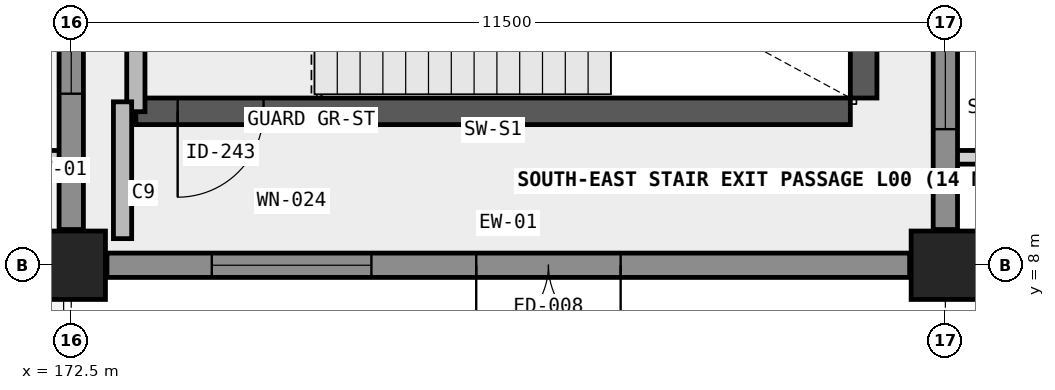
"""IFC4 building model, lengths in metres.
Left out: names, types, materials, properties, quantities, classifications, styles, units other than length and angle.
Written with IfcOpenShell. Run it as: python <this file> out.ifc"""

import sys

from ifc_helpers import new_model, si_unit, direction, frame, frame_2d, origin, origin_2d, place, context, subcontext, project, spatial, rectangle, circle, extrude, element, fill, save


model = new_model("IFC4")
c1 = context("Model", 3, precision=1e-05, world=origin(), true_north=direction((0.0, 1.0)))
c2 = subcontext(c1, "Body", "Model", "MODEL_VIEW")
j1 = project(units=[si_unit("LENGTHUNIT", "METRE"), si_unit("PLANEANGLEUNIT", "RADIAN")], contexts=[c1])
p1 = place(None, origin())
s1 = spatial("IfcSite", under=j1, at=p1, CompositionType="ELEMENT")
p2 = place(p1, origin())
s2 = spatial("IfcBuilding", under=s1, at=p2, CompositionType="ELEMENT")
p3 = place(p2, origin())
s3 = spatial("IfcBuildingStorey", under=s2, at=p3, CompositionType="ELEMENT", Elevation=0.0)
for number, where, z_axis, x_axis in (
    (1, (172.5, 8.0, 0.0), (0.0, 0.0, 1.0), (1.0, 0.0, 0.0)),
    (2, (184.0, 8.0, 0.0), (0.0, 0.0, 1.0), (1.0, 0.0, 0.0)),
):
    element("IfcColumn", number, at=place(p3, frame(where, z_axis=z_axis, x_axis=x_axis)), inside=s3, PredefinedType="COLUMN", context=c2, shape_type="SweptSolid", body=[
        extrude(circle(Radius=0.45, at=origin_2d()), origin(), (0.0, 0.0, 1.0), 4.2),
    ])
p4 = place(p3, frame((173.35, 10.025, 0.0), z_axis=(0.0, 0.0, 1.0), x_axis=(1.0, 0.0, 0.0)))
e3 = element("IfcWall", 3, at=p4, inside=s3, PredefinedType="SHEAR", context=c2, shape_type="SweptSolid", body=[
    extrude(rectangle(XDim=9.4, YDim=0.35, at=frame_2d((4.7, 0.0))), origin(), (0.0, 0.0, 1.0), 4.2),
])
p5 = place(p4, frame((0.55, 0.0, 0.0)))
e4 = element("IfcOpeningElement", 4, at=p5, cuts=e3, PredefinedType="OPENING", context=c2, shape_type="SweptSolid", body=[
    extrude(rectangle(XDim=1.13, YDim=2.15, at=frame_2d((0.565, 1.075))), frame((0.0, 0.185, 0.0), z_axis=(0.0, -1.0, 0.0), x_axis=(1.0, 0.0, 0.0)), (0.0, 0.0, 1.0), 0.37),
])
p6 = place(p3, frame((182.925, 10.2, 0.0), z_axis=(0.0, 0.0, 1.0), x_axis=(0.0, 1.0, 0.0)))
e5 = element("IfcWall", 5, at=p6, inside=s3, PredefinedType="SHEAR", context=c2, shape_type="SweptSolid", body=[
    extrude(rectangle(XDim=3.8, YDim=0.35, at=frame_2d((1.9, 0.0))), origin(), (0.0, 0.0, 1.0), 4.2),
])
p7 = place(p3, frame((172.5, 8.47, 0.0), z_axis=(0.0, 0.0, 1.0), x_axis=(0.0, 1.0, 0.0)))
e6 = element("IfcWall", 6, at=p7, inside=s3, PredefinedType="SOLIDWALL", context=c2, shape_type="SweptSolid", body=[
    extrude(rectangle(XDim=8.76, YDim=0.32, at=frame_2d((4.38, 0.0))), origin(), (0.0, 0.0, 1.0), 3.0),
])
p8 = place(p7, frame((1.787, 0.0, 0.85)))
e7 = element("IfcOpeningElement", 7, at=p8, cuts=e6, PredefinedType="OPENING", context=c2, shape_type="SweptSolid", body=[
    extrude(rectangle(XDim=1.7, YDim=1.5, at=frame_2d((0.85, 0.75))), frame((0.0, 0.17, 0.0), z_axis=(0.0, -1.0, 0.0), x_axis=(1.0, 0.0, 0.0)), (0.0, 0.0, 1.0), 0.34),
])
p9 = place(p7, frame((5.273, 0.0, 0.85)))
e8 = element("IfcOpeningElement", 8, at=p9, cuts=e6, PredefinedType="OPENING", context=c2, shape_type="SweptSolid", body=[
    extrude(rectangle(XDim=1.7, YDim=1.5, at=frame_2d((0.85, 0.75))), frame((0.0, 0.17, 0.0), z_axis=(0.0, -1.0, 0.0), x_axis=(1.0, 0.0, 0.0)), (0.0, 0.0, 1.0), 0.34),
])
p10 = place(p3, frame((172.97, 8.0, 0.0), z_axis=(0.0, 0.0, 1.0), x_axis=(1.0, 0.0, 0.0)))
e9 = element("IfcWall", 9, at=p10, inside=s3, PredefinedType="SOLIDWALL", context=c2, shape_type="SweptSolid", body=[
    extrude(rectangle(XDim=10.56, YDim=0.32, at=frame_2d((5.28, 0.0))), origin(), (0.0, 0.0, 1.0), 3.0),
])
p11 = place(p10, frame((4.858, 0.0, 0.0)))
e10 = element("IfcOpeningElement", 10, at=p11, cuts=e9, PredefinedType="OPENING", context=c2, shape_type="SweptSolid", body=[
    extrude(rectangle(XDim=1.9, YDim=2.2, at=frame_2d((0.95, 1.1))), frame((0.0, 0.17, 0.0), z_axis=(0.0, -1.0, 0.0), x_axis=(1.0, 0.0, 0.0)), (0.0, 0.0, 1.0), 0.34),
])
p12 = place(p10, frame((1.379, 0.0, 0.78)))
e11 = element("IfcOpeningElement", 11, at=p12, cuts=e9, PredefinedType="OPENING", context=c2, shape_type="SweptSolid", body=[
    extrude(rectangle(XDim=2.1, YDim=2.1, at=frame_2d((1.05, 1.05))), frame((0.0, 0.17, 0.0), z_axis=(0.0, -1.0, 0.0), x_axis=(1.0, 0.0, 0.0)), (0.0, 0.0, 1.0), 0.34),
])
p13 = place(p3, frame((184.0, 8.47, 0.0), z_axis=(0.0, 0.0, 1.0), x_axis=(0.0, 1.0, 0.0)))
e12 = element("IfcWall", 12, at=p13, inside=s3, PredefinedType="SOLIDWALL", context=c2, shape_type="SweptSolid", body=[
    extrude(rectangle(XDim=8.76, YDim=0.32, at=frame_2d((4.38, 0.0))), origin(), (0.0, 0.0, 1.0), 3.2),
])
p14 = place(p13, frame((1.32, 0.0, 0.84)))
e13 = element("IfcOpeningElement", 13, at=p14, cuts=e12, PredefinedType="OPENING", context=c2, shape_type="SweptSolid", body=[
    extrude(rectangle(XDim=2.4, YDim=2.1, at=frame_2d((1.2, 1.05))), frame((0.0, 0.17, 0.0), z_axis=(0.0, -1.0, 0.0), x_axis=(1.0, 0.0, 0.0)), (0.0, 0.0, 1.0), 0.34),
])
p15 = place(p13, frame((5.04, 0.0, 0.84)))
e14 = element("IfcOpeningElement", 14, at=p15, cuts=e12, PredefinedType="OPENING", context=c2, shape_type="SweptSolid", body=[
    extrude(rectangle(XDim=2.4, YDim=2.1, at=frame_2d((1.2, 1.05))), frame((0.0, 0.17, 0.0), z_axis=(0.0, -1.0, 0.0), x_axis=(1.0, 0.0, 0.0)), (0.0, 0.0, 1.0), 0.34),
])
p16 = place(p3, frame((173.35, 10.02, 0.0), z_axis=(0.0, 0.0, 1.0), x_axis=(0.0, 1.0, 0.0)))
e15 = element("IfcWall", 15, at=p16, inside=s3, PredefinedType="SOLIDWALL", context=c2, shape_type="SweptSolid", body=[
    extrude(rectangle(XDim=4.16, YDim=0.24, at=frame_2d((2.08, 0.0))), origin(), (0.0, 0.0, 1.0), 3.88),
])
p17 = place(p16, frame((1.3, 0.0, 0.0)))
e16 = element("IfcOpeningElement", 16, at=p17, cuts=e15, PredefinedType="OPENING", context=c2, shape_type="SweptSolid", body=[
    extrude(rectangle(XDim=1.13, YDim=2.15, at=frame_2d((0.565, 1.075))), frame((0.0, 0.13, 0.0), z_axis=(0.0, -1.0, 0.0), x_axis=(1.0, 0.0, 0.0)), (0.0, 0.0, 1.0), 0.26),
])
p18 = place(p3, frame((173.175, 8.35, 0.0), z_axis=(0.0, 0.0, 1.0), x_axis=(0.0, 1.0, 0.0)))
e17 = element("IfcWall", 17, at=p18, inside=s3, PredefinedType="SOLIDWALL", context=c2, shape_type="SweptSolid", body=[
    extrude(rectangle(XDim=1.8, YDim=0.24, at=frame_2d((0.9, 0.0))), origin(), (0.0, 0.0, 1.0), 3.88),
])
p19 = place(p8, origin())
e18 = element("IfcWindow", 18, at=p19, inside=s3, PartitioningType="SINGLE_PANEL", PredefinedType="WINDOW", context=c2, shape_type="SweptSolid", body=[
    extrude(rectangle(XDim=1.7, YDim=1.5, at=frame_2d((0.85, 0.75))), frame((0.0, 0.03, 0.0), z_axis=(0.0, -1.0, 0.0), x_axis=(1.0, 0.0, 0.0)), (0.0, 0.0, 1.0), 0.06),
])
fill(e7, e18)
p20 = place(p11, frame((0.95, 0.0, 0.0), z_axis=(0.0, 0.0, 1.0), x_axis=(-1.0, 0.0, 0.0)))
e19 = element("IfcDoor", 19, at=p20, inside=s3, OperationType="DOUBLE_DOOR_SINGLE_SWING", PredefinedType="DOOR", context=c2, shape_type="SweptSolid", body=[
    extrude(rectangle(XDim=1.9, YDim=2.2, at=frame_2d((0.0, 1.1))), frame((0.0, 0.025, 0.0), z_axis=(0.0, -1.0, 0.0), x_axis=(1.0, 0.0, 0.0)), (0.0, 0.0, 1.0), 0.05),
])
fill(e10, e19)
p21 = place(p12, origin())
e20 = element("IfcWindow", 20, at=p21, inside=s3, PartitioningType="SINGLE_PANEL", PredefinedType="WINDOW", context=c2, shape_type="SweptSolid", body=[
    extrude(rectangle(XDim=2.1, YDim=2.1, at=frame_2d((1.05, 1.05))), frame((0.0, 0.03, 0.0), z_axis=(0.0, -1.0, 0.0), x_axis=(1.0, 0.0, 0.0)), (0.0, 0.0, 1.0), 0.06),
])
fill(e11, e20)
p22 = place(p14, origin())
e21 = element("IfcWindow", 21, at=p22, inside=s3, PartitioningType="SINGLE_PANEL", PredefinedType="WINDOW", context=c2, shape_type="SweptSolid", body=[
    extrude(rectangle(XDim=2.4, YDim=2.1, at=frame_2d((1.2, 1.05))), frame((0.0, 0.03, 0.0), z_axis=(0.0, -1.0, 0.0), x_axis=(1.0, 0.0, 0.0)), (0.0, 0.0, 1.0), 0.06),
])
fill(e13, e21)
p23 = place(p5, frame((0.565, 0.0, 0.0), z_axis=(0.0, 0.0, 1.0), x_axis=(-1.0, 0.0, 0.0)))
e22 = element("IfcDoor", 22, at=p23, inside=s3, OperationType="SINGLE_SWING_LEFT", PredefinedType="DOOR", context=c2, shape_type="SweptSolid", body=[
    extrude(rectangle(XDim=1.13, YDim=2.15, at=frame_2d((0.0, 1.075))), frame((0.0, 0.025, 0.0), z_axis=(0.0, -1.0, 0.0), x_axis=(1.0, 0.0, 0.0)), (0.0, 0.0, 1.0), 0.05),
])
fill(e4, e22)
save(model, sys.argv[1])
